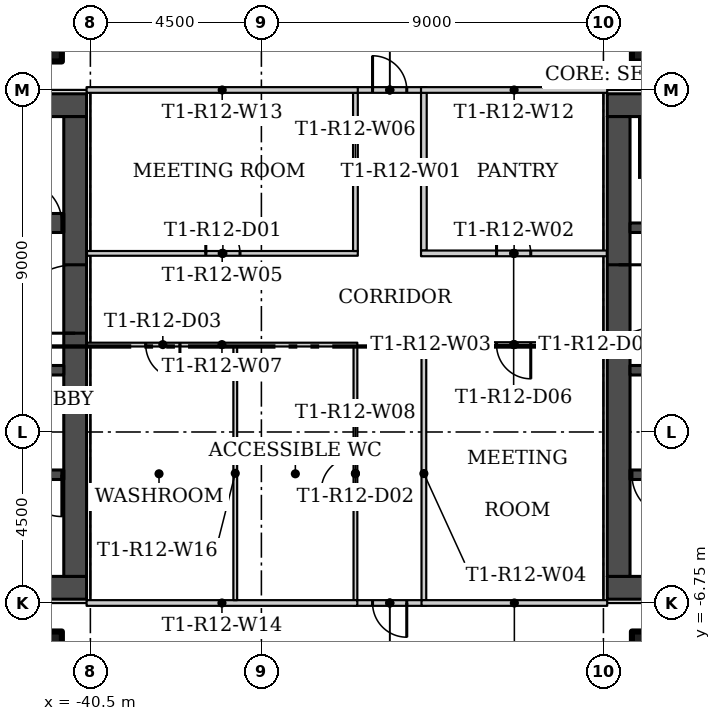
"""IFC4 building model, lengths in metres.
Left out: names, types, materials, properties, quantities, classifications, styles, units other than length and angle.
Written with IfcOpenShell. Run it as: python <this file> out.ifc"""

import sys

from ifc_helpers import new_model, si_unit, direction, frame, frame_2d, origin, origin_2d, place, context, subcontext, project, spatial, rectangle, hollow_rectangle, extrude, element, fill, save


model = new_model("IFC4")
c1 = context("Model", 3, precision=1e-05, world=origin(), true_north=direction((0.0, 1.0)))
c2 = subcontext(c1, "Body", "Model", "MODEL_VIEW")
j1 = project(units=[si_unit("LENGTHUNIT", "METRE"), si_unit("PLANEANGLEUNIT", "RADIAN")], contexts=[c1])
p1 = place(None, origin())
s1 = spatial("IfcSite", under=j1, at=p1, CompositionType="ELEMENT")
p2 = place(p1, origin())
s2 = spatial("IfcBuilding", under=s1, at=p2, CompositionType="ELEMENT")
p3 = place(p2, frame((0.0, 0.0, 113.1)))
s3 = spatial("IfcBuildingStorey", under=s2, at=p3, CompositionType="ELEMENT", Elevation=113.1)
for number, where in (
    (1, (-25.625, 8.125, 0.0)),
    (2, (-25.625, -8.125, 0.0)),
    (3, (-41.875, 8.125, 0.0)),
    (4, (-41.875, -8.125, 0.0)),
):
    element("IfcColumn", number, at=place(p3, frame(where)), inside=s3, PredefinedType="COLUMN", context=c2, shape_type="SweptSolid", body=[
        extrude(hollow_rectangle(XDim=1.25, YDim=1.25, WallThickness=0.05, at=origin_2d()), origin(), (0.0, 0.0, 1.0), 3.55),
    ])
p4 = place(p3, frame((-31.725, 6.675, 0.0), z_axis=(0.0, 0.0, 1.0), x_axis=(0.0, -1.0, 0.0)))
e5 = element("IfcWall", 5, at=p4, inside=s3, PredefinedType="PARTITIONING", context=c2, shape_type="SweptSolid", body=[
    extrude(rectangle(XDim=4.15, YDim=0.15, at=frame_2d((2.075, 0.0))), origin(), (0.0, 0.0, 1.0), 3.55),
])
p5 = place(p3, frame((-31.8, 2.45, 0.0)))
e6 = element("IfcWall", 6, at=p5, inside=s3, PredefinedType="PARTITIONING", context=c2, shape_type="SweptSolid", body=[
    extrude(rectangle(XDim=4.9, YDim=0.15, at=frame_2d((2.45, 0.0))), origin(), (0.0, 0.0, 1.0), 3.55),
])
p6 = place(p5, frame((1.987, 0.0, 0.0)))
e7 = element("IfcOpeningElement", 7, at=p6, cuts=e6, PredefinedType="OPENING", context=c2, shape_type="SweptSolid", body=[
    extrude(rectangle(XDim=0.9, YDim=2.1, at=frame_2d((0.45, 1.05))), frame((0.0, 0.085, 0.0), z_axis=(0.0, -1.0, 0.0), x_axis=(1.0, 0.0, 0.0)), (0.0, 0.0, 1.0), 0.17),
])
p7 = place(p3, frame((-26.9, 0.05, 0.0), z_axis=(0.0, 0.0, 1.0), x_axis=(-1.0, 0.0, 0.0)))
e8 = element("IfcWall", 8, at=p7, inside=s3, PredefinedType="PARTITIONING", context=c2, shape_type="SweptSolid", body=[
    extrude(rectangle(XDim=4.887, YDim=0.125, at=frame_2d((2.444, 0.0))), origin(), (0.0, 0.0, 1.0), 3.55),
])
p8 = place(p7, frame((2.012, 0.0, 0.0)))
e9 = element("IfcOpeningElement", 9, at=p8, cuts=e8, PredefinedType="OPENING", context=c2, shape_type="SweptSolid", body=[
    extrude(rectangle(XDim=0.9, YDim=2.1, at=frame_2d((0.45, 1.05))), frame((0.0, 0.073, 0.0), z_axis=(0.0, -1.0, 0.0), x_axis=(1.0, 0.0, 0.0)), (0.0, 0.0, 1.0), 0.145),
])
p9 = place(p3, frame((-31.725, -0.013, 0.0), z_axis=(0.0, 0.0, 1.0), x_axis=(0.0, -1.0, 0.0)))
e10 = element("IfcWall", 10, at=p9, inside=s3, PredefinedType="PARTITIONING", context=c2, shape_type="SweptSolid", body=[
    extrude(rectangle(XDim=6.662, YDim=0.125, at=frame_2d((3.331, 0.0))), origin(), (0.0, 0.0, 1.0), 3.55),
])
p10 = place(p3, frame((-40.6, 2.45, 0.0)))
e11 = element("IfcWall", 11, at=p10, inside=s3, PredefinedType="PARTITIONING", context=c2, shape_type="SweptSolid", body=[
    extrude(rectangle(XDim=7.137, YDim=0.125, at=frame_2d((3.569, 0.0))), origin(), (0.0, 0.0, 1.0), 3.55),
])
p11 = place(p10, frame((3.137, 0.0, 0.0)))
e12 = element("IfcOpeningElement", 12, at=p11, cuts=e11, PredefinedType="OPENING", context=c2, shape_type="SweptSolid", body=[
    extrude(rectangle(XDim=0.9, YDim=2.1, at=frame_2d((0.45, 1.05))), frame((0.0, 0.073, 0.0), z_axis=(0.0, -1.0, 0.0), x_axis=(1.0, 0.0, 0.0)), (0.0, 0.0, 1.0), 0.145),
])
p12 = place(p3, frame((-33.525, 2.513, 0.0), z_axis=(0.0, 0.0, 1.0), x_axis=(0.0, 1.0, 0.0)))
e13 = element("IfcWall", 13, at=p12, inside=s3, PredefinedType="PARTITIONING", context=c2, shape_type="SweptSolid", body=[
    extrude(rectangle(XDim=4.162, YDim=0.125, at=frame_2d((2.081, 0.0))), origin(), (0.0, 0.0, 1.0), 3.55),
])
p13 = place(p3, frame((-33.475, 0.05, 0.0), z_axis=(0.0, 0.0, 1.0), x_axis=(-1.0, 0.0, 0.0)))
e14 = element("IfcWall", 14, at=p13, inside=s3, PredefinedType="PARTITIONING", context=c2, shape_type="SweptSolid", body=[
    extrude(rectangle(XDim=7.125, YDim=0.1, at=frame_2d((3.562, 0.0))), origin(), (0.0, 0.0, 1.0), 3.55),
])
p14 = place(p13, frame((4.668, 0.0, 0.0)))
e15 = element("IfcOpeningElement", 15, at=p14, cuts=e14, PredefinedType="OPENING", context=c2, shape_type="SweptSolid", body=[
    extrude(rectangle(XDim=0.9, YDim=2.1, at=frame_2d((0.45, 1.05))), frame((0.0, 0.06, 0.0), z_axis=(0.0, -1.0, 0.0), x_axis=(1.0, 0.0, 0.0)), (0.0, 0.0, 1.0), 0.12),
])
p15 = place(p3, frame((-33.525, -6.675, 0.0), z_axis=(0.0, 0.0, 1.0), x_axis=(0.0, 1.0, 0.0)))
e16 = element("IfcWall", 16, at=p15, inside=s3, PredefinedType="PARTITIONING", context=c2, shape_type="SweptSolid", body=[
    extrude(rectangle(XDim=6.675, YDim=0.1, at=frame_2d((3.337, 0.0))), origin(), (0.0, 0.0, 1.0), 3.55),
])
p16 = place(p15, frame((2.875, 0.0, 0.0)))
e17 = element("IfcOpeningElement", 17, at=p16, cuts=e16, PredefinedType="OPENING", context=c2, shape_type="SweptSolid", body=[
    extrude(rectangle(XDim=0.9, YDim=2.1, at=frame_2d((0.45, 1.05))), frame((0.0, 0.06, 0.0), z_axis=(0.0, -1.0, 0.0), x_axis=(1.0, 0.0, 0.0)), (0.0, 0.0, 1.0), 0.12),
])
p17 = place(p3, frame((-33.588, 6.75, 0.0)))
e18 = element("IfcWall", 18, at=p17, inside=s3, PredefinedType="PARTITIONING", context=c2, shape_type="SweptSolid", body=[
    extrude(rectangle(XDim=1.938, YDim=0.15, at=frame_2d((0.969, 0.0))), origin(), (0.0, 0.0, 1.0), 3.55),
])
p18 = place(p17, frame((0.513, 0.0, 0.0)))
e19 = element("IfcOpeningElement", 19, at=p18, cuts=e18, PredefinedType="OPENING", context=c2, shape_type="SweptSolid", body=[
    extrude(rectangle(XDim=0.9, YDim=2.1, at=frame_2d((0.45, 1.05))), frame((0.0, 0.085, 0.0), z_axis=(0.0, -1.0, 0.0), x_axis=(1.0, 0.0, 0.0)), (0.0, 0.0, 1.0), 0.17),
])
p19 = place(p3, frame((-31.662, -6.75, 0.0), z_axis=(0.0, 0.0, 1.0), x_axis=(-1.0, 0.0, 0.0)))
e20 = element("IfcWall", 20, at=p19, inside=s3, PredefinedType="PARTITIONING", context=c2, shape_type="SweptSolid", body=[
    extrude(rectangle(XDim=1.913, YDim=0.15, at=frame_2d((0.957, 0.0))), origin(), (0.0, 0.0, 1.0), 3.55),
])
p20 = place(p19, frame((0.513, 0.0, 0.0)))
e21 = element("IfcOpeningElement", 21, at=p20, cuts=e20, PredefinedType="OPENING", context=c2, shape_type="SweptSolid", body=[
    extrude(rectangle(XDim=0.9, YDim=2.1, at=frame_2d((0.45, 1.05))), frame((0.0, 0.085, 0.0), z_axis=(0.0, -1.0, 0.0), x_axis=(1.0, 0.0, 0.0)), (0.0, 0.0, 1.0), 0.17),
])
p21 = place(p3, frame((-26.9, 6.75, 0.0), z_axis=(0.0, 0.0, 1.0), x_axis=(-1.0, 0.0, 0.0)))
e22 = element("IfcWall", 22, at=p21, inside=s3, PredefinedType="PARTITIONING", context=c2, shape_type="SweptSolid", body=[
    extrude(rectangle(XDim=4.9, YDim=0.15, at=frame_2d((2.45, 0.0))), origin(), (0.0, 0.0, 1.0), 3.55),
])
p22 = place(p3, frame((-33.463, 6.75, 0.0), z_axis=(0.0, 0.0, 1.0), x_axis=(-1.0, 0.0, 0.0)))
e23 = element("IfcWall", 23, at=p22, inside=s3, PredefinedType="PARTITIONING", context=c2, shape_type="SweptSolid", body=[
    extrude(rectangle(XDim=7.137, YDim=0.15, at=frame_2d((3.569, 0.0))), origin(), (0.0, 0.0, 1.0), 3.55),
])
p23 = place(p3, frame((-40.6, -6.75, 0.0)))
e24 = element("IfcWall", 24, at=p23, inside=s3, PredefinedType="PARTITIONING", context=c2, shape_type="SweptSolid", body=[
    extrude(rectangle(XDim=7.125, YDim=0.15, at=frame_2d((3.562, 0.0))), origin(), (0.0, 0.0, 1.0), 3.55),
])
p24 = place(p3, frame((-31.787, -6.75, 0.0)))
e25 = element("IfcWall", 25, at=p24, inside=s3, PredefinedType="PARTITIONING", context=c2, shape_type="SweptSolid", body=[
    extrude(rectangle(XDim=4.887, YDim=0.15, at=frame_2d((2.444, 0.0))), origin(), (0.0, 0.0, 1.0), 3.55),
])
p25 = place(p3, frame((-36.688, -6.675, 0.0), z_axis=(0.0, 0.0, 1.0), x_axis=(0.0, 1.0, 0.0)))
e26 = element("IfcWall", 26, at=p25, inside=s3, PredefinedType="PARTITIONING", context=c2, shape_type="SweptSolid", body=[
    extrude(rectangle(XDim=6.675, YDim=0.1, at=frame_2d((3.337, 0.0))), origin(), (0.0, 0.0, 1.0), 3.55),
])
for number, where in (
    (27, (-26.9, -6.35, 0.0)),
    (28, (-26.9, 6.35, 0.0)),
):
    element("IfcWall", number, at=place(p3, frame(where)), inside=s3, PredefinedType="SHEAR", context=c2, shape_type="SweptSolid", body=[
        extrude(rectangle(XDim=13.3, YDim=0.6, at=frame_2d((6.65, 0.0))), origin(), (0.0, 0.0, 1.0), 3.55),
    ])
p26 = place(p3, frame((-26.6, 6.05, 0.0), z_axis=(0.0, 0.0, 1.0), x_axis=(0.0, -1.0, 0.0)))
e29 = element("IfcWall", 29, at=p26, inside=s3, PredefinedType="SHEAR", context=c2, shape_type="SweptSolid", body=[
    extrude(rectangle(XDim=12.1, YDim=0.6, at=frame_2d((6.05, 0.0))), origin(), (0.0, 0.0, 1.0), 3.55),
])
p27 = place(p26, frame((3.9, 0.0, 0.0)))
e30 = element("IfcOpeningElement", 30, at=p27, cuts=e29, PredefinedType="OPENING", context=c2, shape_type="SweptSolid", body=[
    extrude(rectangle(XDim=1.8, YDim=2.4, at=frame_2d((0.9, 1.2))), frame((0.0, 0.31, 0.0), z_axis=(0.0, -1.0, 0.0), x_axis=(1.0, 0.0, 0.0)), (0.0, 0.0, 1.0), 0.62),
])
p28 = place(p3, frame((-14.2, -3.375, 0.0), z_axis=(0.0, 0.0, 1.0), x_axis=(-1.0, 0.0, 0.0)))
e31 = element("IfcWall", 31, at=p28, inside=s3, PredefinedType="SHEAR", context=c2, shape_type="SweptSolid", body=[
    extrude(rectangle(XDim=12.1, YDim=0.25, at=frame_2d((6.05, 0.0))), origin(), (0.0, 0.0, 1.0), 3.55),
])
p29 = place(p28, frame((10.95, 0.0, 0.0)))
e32 = element("IfcOpeningElement", 32, at=p29, cuts=e31, PredefinedType="OPENING", context=c2, shape_type="SweptSolid", body=[
    extrude(rectangle(XDim=1.1, YDim=2.1, at=frame_2d((0.55, 1.05))), frame((0.0, 0.135, 0.0), z_axis=(0.0, -1.0, 0.0), x_axis=(1.0, 0.0, 0.0)), (0.0, 0.0, 1.0), 0.27),
])
p30 = place(p3, frame((-14.2, -0.625, 0.0), z_axis=(0.0, 0.0, 1.0), x_axis=(-1.0, 0.0, 0.0)))
e33 = element("IfcWall", 33, at=p30, inside=s3, PredefinedType="SHEAR", context=c2, shape_type="SweptSolid", body=[
    extrude(rectangle(XDim=12.1, YDim=0.25, at=frame_2d((6.05, 0.0))), origin(), (0.0, 0.0, 1.0), 3.55),
])
p31 = place(p30, frame((8.65, 0.0, 0.0)))
e34 = element("IfcOpeningElement", 34, at=p31, cuts=e33, PredefinedType="OPENING", context=c2, shape_type="SweptSolid", body=[
    extrude(rectangle(XDim=1.2, YDim=2.1, at=frame_2d((0.6, 1.05))), frame((0.0, 0.135, 0.0), z_axis=(0.0, -1.0, 0.0), x_axis=(1.0, 0.0, 0.0)), (0.0, 0.0, 1.0), 0.27),
])
p32 = place(p30, frame((1.175, 0.0, 0.0)))
e35 = element("IfcOpeningElement", 35, at=p32, cuts=e33, PredefinedType="OPENING", context=c2, shape_type="SweptSolid", body=[
    extrude(rectangle(XDim=0.9, YDim=2.1, at=frame_2d((0.45, 1.05))), frame((0.0, 0.135, 0.0), z_axis=(0.0, -1.0, 0.0), x_axis=(1.0, 0.0, 0.0)), (0.0, 0.0, 1.0), 0.27),
])
p33 = place(p3, frame((-26.3, 3.125, 0.0)))
e36 = element("IfcWall", 36, at=p33, inside=s3, PredefinedType="SHEAR", context=c2, shape_type="SweptSolid", body=[
    extrude(rectangle(XDim=12.1, YDim=0.25, at=frame_2d((6.05, 0.0))), origin(), (0.0, 0.0, 1.0), 3.55),
])
p34 = place(p33, frame((0.85, 0.0, 0.0)))
e37 = element("IfcOpeningElement", 37, at=p34, cuts=e36, PredefinedType="OPENING", context=c2, shape_type="SweptSolid", body=[
    extrude(rectangle(XDim=1.1, YDim=2.1, at=frame_2d((0.55, 1.05))), frame((0.0, 0.135, 0.0), z_axis=(0.0, -1.0, 0.0), x_axis=(1.0, 0.0, 0.0)), (0.0, 0.0, 1.0), 0.27),
])
p35 = place(p33, frame((3.9, 0.0, 0.0)))
e38 = element("IfcOpeningElement", 38, at=p35, cuts=e36, PredefinedType="OPENING", context=c2, shape_type="SweptSolid", body=[
    extrude(rectangle(XDim=1.1, YDim=2.1, at=frame_2d((0.55, 1.05))), frame((0.0, 0.135, 0.0), z_axis=(0.0, -1.0, 0.0), x_axis=(1.0, 0.0, 0.0)), (0.0, 0.0, 1.0), 0.27),
])
for number, where, z_axis, x_axis in (
    (39, (-40.6, -6.35, 0.0), (0.0, 0.0, 1.0), (-1.0, 0.0, 0.0)),
    (40, (-40.6, 6.35, 0.0), (0.0, 0.0, 1.0), (-1.0, 0.0, 0.0)),
):
    element("IfcWall", number, at=place(p3, frame(where, z_axis=z_axis, x_axis=x_axis)), inside=s3, PredefinedType="SHEAR", context=c2, shape_type="SweptSolid", body=[
        extrude(rectangle(XDim=13.3, YDim=0.6, at=frame_2d((6.65, 0.0))), origin(), (0.0, 0.0, 1.0), 3.55),
    ])
p36 = place(p3, frame((-40.9, -6.05, 0.0), z_axis=(0.0, 0.0, 1.0), x_axis=(0.0, 1.0, 0.0)))
e41 = element("IfcWall", 41, at=p36, inside=s3, PredefinedType="SHEAR", context=c2, shape_type="SweptSolid", body=[
    extrude(rectangle(XDim=12.1, YDim=0.6, at=frame_2d((6.05, 0.0))), origin(), (0.0, 0.0, 1.0), 3.55),
])
p37 = place(p36, frame((6.4, 0.0, 0.0)))
e42 = element("IfcOpeningElement", 42, at=p37, cuts=e41, PredefinedType="OPENING", context=c2, shape_type="SweptSolid", body=[
    extrude(rectangle(XDim=1.8, YDim=2.4, at=frame_2d((0.9, 1.2))), frame((0.0, 0.31, 0.0), z_axis=(0.0, -1.0, 0.0), x_axis=(1.0, 0.0, 0.0)), (0.0, 0.0, 1.0), 0.62),
])
p38 = place(p3, frame((-41.2, -3.375, 0.0), z_axis=(0.0, 0.0, 1.0), x_axis=(-1.0, 0.0, 0.0)))
e43 = element("IfcWall", 43, at=p38, inside=s3, PredefinedType="SHEAR", context=c2, shape_type="SweptSolid", body=[
    extrude(rectangle(XDim=12.1, YDim=0.25, at=frame_2d((6.05, 0.0))), origin(), (0.0, 0.0, 1.0), 3.55),
])
p39 = place(p38, frame((0.05, 0.0, 0.0)))
e44 = element("IfcOpeningElement", 44, at=p39, cuts=e43, PredefinedType="OPENING", context=c2, shape_type="SweptSolid", body=[
    extrude(rectangle(XDim=1.1, YDim=2.1, at=frame_2d((0.55, 1.05))), frame((0.0, 0.135, 0.0), z_axis=(0.0, -1.0, 0.0), x_axis=(1.0, 0.0, 0.0)), (0.0, 0.0, 1.0), 0.27),
])
p40 = place(p3, frame((-41.2, -0.625, 0.0), z_axis=(0.0, 0.0, 1.0), x_axis=(-1.0, 0.0, 0.0)))
e45 = element("IfcWall", 45, at=p40, inside=s3, PredefinedType="SHEAR", context=c2, shape_type="SweptSolid", body=[
    extrude(rectangle(XDim=12.1, YDim=0.25, at=frame_2d((6.05, 0.0))), origin(), (0.0, 0.0, 1.0), 3.55),
])
p41 = place(p40, frame((2.25, 0.0, 0.0)))
e46 = element("IfcOpeningElement", 46, at=p41, cuts=e45, PredefinedType="OPENING", context=c2, shape_type="SweptSolid", body=[
    extrude(rectangle(XDim=1.2, YDim=2.1, at=frame_2d((0.6, 1.05))), frame((0.0, 0.135, 0.0), z_axis=(0.0, -1.0, 0.0), x_axis=(1.0, 0.0, 0.0)), (0.0, 0.0, 1.0), 0.27),
])
p42 = place(p40, frame((10.025, 0.0, 0.0)))
e47 = element("IfcOpeningElement", 47, at=p42, cuts=e45, PredefinedType="OPENING", context=c2, shape_type="SweptSolid", body=[
    extrude(rectangle(XDim=0.9, YDim=2.1, at=frame_2d((0.45, 1.05))), frame((0.0, 0.135, 0.0), z_axis=(0.0, -1.0, 0.0), x_axis=(1.0, 0.0, 0.0)), (0.0, 0.0, 1.0), 0.27),
])
p43 = place(p3, frame((-48.5, 3.25, 0.0)))
e48 = element("IfcWall", 48, at=p43, inside=s3, PredefinedType="SHEAR", context=c2, shape_type="SweptSolid", body=[
    extrude(rectangle(XDim=7.3, YDim=0.5, at=frame_2d((3.65, 0.0))), origin(), (0.0, 0.0, 1.0), 3.55),
])
p44 = place(p43, frame((6.15, 0.0, 0.0)))
e49 = element("IfcOpeningElement", 49, at=p44, cuts=e48, PredefinedType="OPENING", context=c2, shape_type="SweptSolid", body=[
    extrude(rectangle(XDim=1.1, YDim=2.1, at=frame_2d((0.55, 1.05))), frame((0.0, 0.26, 0.0), z_axis=(0.0, -1.0, 0.0), x_axis=(1.0, 0.0, 0.0)), (0.0, 0.0, 1.0), 0.52),
])
p45 = place(p11, origin())
e50 = element("IfcDoor", 50, at=p45, inside=s3, OperationType="SINGLE_SWING_LEFT", PredefinedType="DOOR", context=c2, shape_type="SweptSolid", body=[
    extrude(rectangle(XDim=0.9, YDim=2.1, at=frame_2d((0.45, 1.05))), frame((0.0, 0.025, 0.0), z_axis=(0.0, -1.0, 0.0), x_axis=(1.0, 0.0, 0.0)), (0.0, 0.0, 1.0), 0.05),
])
fill(e12, e50)
p46 = place(p16, origin())
e51 = element("IfcDoor", 51, at=p46, inside=s3, OperationType="SINGLE_SWING_RIGHT", PredefinedType="DOOR", context=c2, shape_type="SweptSolid", body=[
    extrude(rectangle(XDim=0.9, YDim=2.1, at=frame_2d((0.45, 1.05))), frame((0.0, 0.025, 0.0), z_axis=(0.0, -1.0, 0.0), x_axis=(1.0, 0.0, 0.0)), (0.0, 0.0, 1.0), 0.05),
])
fill(e17, e51)
p47 = place(p14, origin())
e52 = element("IfcDoor", 52, at=p47, inside=s3, OperationType="SINGLE_SWING_LEFT", PredefinedType="DOOR", context=c2, shape_type="SweptSolid", body=[
    extrude(rectangle(XDim=0.9, YDim=2.1, at=frame_2d((0.45, 1.05))), frame((0.0, 0.025, 0.0), z_axis=(0.0, -1.0, 0.0), x_axis=(1.0, 0.0, 0.0)), (0.0, 0.0, 1.0), 0.05),
])
fill(e15, e52)
p48 = place(p18, origin())
e53 = element("IfcDoor", 53, at=p48, inside=s3, OperationType="SINGLE_SWING_LEFT", PredefinedType="DOOR", context=c2, shape_type="SweptSolid", body=[
    extrude(rectangle(XDim=0.9, YDim=2.1, at=frame_2d((0.45, 1.05))), frame((0.0, 0.025, 0.0), z_axis=(0.0, -1.0, 0.0), x_axis=(1.0, 0.0, 0.0)), (0.0, 0.0, 1.0), 0.05),
])
fill(e19, e53)
p49 = place(p20, origin())
e54 = element("IfcDoor", 54, at=p49, inside=s3, OperationType="SINGLE_SWING_RIGHT", PredefinedType="DOOR", context=c2, shape_type="SweptSolid", body=[
    extrude(rectangle(XDim=0.9, YDim=2.1, at=frame_2d((0.45, 1.05))), frame((0.0, 0.025, 0.0), z_axis=(0.0, -1.0, 0.0), x_axis=(1.0, 0.0, 0.0)), (0.0, 0.0, 1.0), 0.05),
])
fill(e21, e54)
p50 = place(p6, origin())
e55 = element("IfcDoor", 55, at=p50, inside=s3, OperationType="SINGLE_SWING_LEFT", PredefinedType="DOOR", context=c2, shape_type="SweptSolid", body=[
    extrude(rectangle(XDim=0.9, YDim=2.1, at=frame_2d((0.45, 1.05))), frame((0.0, 0.025, 0.0), z_axis=(0.0, -1.0, 0.0), x_axis=(1.0, 0.0, 0.0)), (0.0, 0.0, 1.0), 0.05),
])
fill(e7, e55)
p51 = place(p8, origin())
e56 = element("IfcDoor", 56, at=p51, inside=s3, OperationType="SINGLE_SWING_LEFT", PredefinedType="DOOR", context=c2, shape_type="SweptSolid", body=[
    extrude(rectangle(XDim=0.9, YDim=2.1, at=frame_2d((0.45, 1.05))), frame((0.0, 0.025, 0.0), z_axis=(0.0, -1.0, 0.0), x_axis=(1.0, 0.0, 0.0)), (0.0, 0.0, 1.0), 0.05),
])
fill(e9, e56)
p52 = place(p27, origin())
e57 = element("IfcDoor", 57, at=p52, inside=s3, OperationType="DOUBLE_DOOR_SINGLE_SWING", PredefinedType="DOOR", context=c2, shape_type="SweptSolid", body=[
    extrude(rectangle(XDim=1.8, YDim=2.4, at=frame_2d((0.9, 1.2))), frame((0.0, 0.025, 0.0), z_axis=(0.0, -1.0, 0.0), x_axis=(1.0, 0.0, 0.0)), (0.0, 0.0, 1.0), 0.05),
])
fill(e30, e57)
p53 = place(p29, origin())
e58 = element("IfcDoor", 58, at=p53, inside=s3, OperationType="SINGLE_SWING_RIGHT", PredefinedType="DOOR", context=c2, shape_type="SweptSolid", body=[
    extrude(rectangle(XDim=1.1, YDim=2.1, at=frame_2d((0.55, 1.05))), frame((0.0, 0.025, 0.0), z_axis=(0.0, -1.0, 0.0), x_axis=(1.0, 0.0, 0.0)), (0.0, 0.0, 1.0), 0.05),
])
fill(e32, e58)
p54 = place(p37, origin())
e59 = element("IfcDoor", 59, at=p54, inside=s3, OperationType="DOUBLE_DOOR_SINGLE_SWING", PredefinedType="DOOR", context=c2, shape_type="SweptSolid", body=[
    extrude(rectangle(XDim=1.8, YDim=2.4, at=frame_2d((0.9, 1.2))), frame((0.0, 0.025, 0.0), z_axis=(0.0, -1.0, 0.0), x_axis=(1.0, 0.0, 0.0)), (0.0, 0.0, 1.0), 0.05),
])
fill(e42, e59)
p55 = place(p39, origin())
e60 = element("IfcDoor", 60, at=p55, inside=s3, OperationType="SINGLE_SWING_LEFT", PredefinedType="DOOR", context=c2, shape_type="SweptSolid", body=[
    extrude(rectangle(XDim=1.1, YDim=2.1, at=frame_2d((0.55, 1.05))), frame((0.0, 0.025, 0.0), z_axis=(0.0, -1.0, 0.0), x_axis=(1.0, 0.0, 0.0)), (0.0, 0.0, 1.0), 0.05),
])
fill(e44, e60)
p56 = place(p44, origin())
e61 = element("IfcDoor", 61, at=p56, inside=s3, OperationType="SINGLE_SWING_RIGHT", PredefinedType="DOOR", context=c2, shape_type="SweptSolid", body=[
    extrude(rectangle(XDim=1.1, YDim=2.1, at=frame_2d((0.55, 1.05))), frame((0.0, 0.025, 0.0), z_axis=(0.0, -1.0, 0.0), x_axis=(1.0, 0.0, 0.0)), (0.0, 0.0, 1.0), 0.05),
])
fill(e49, e61)
save(model, sys.argv[1])
